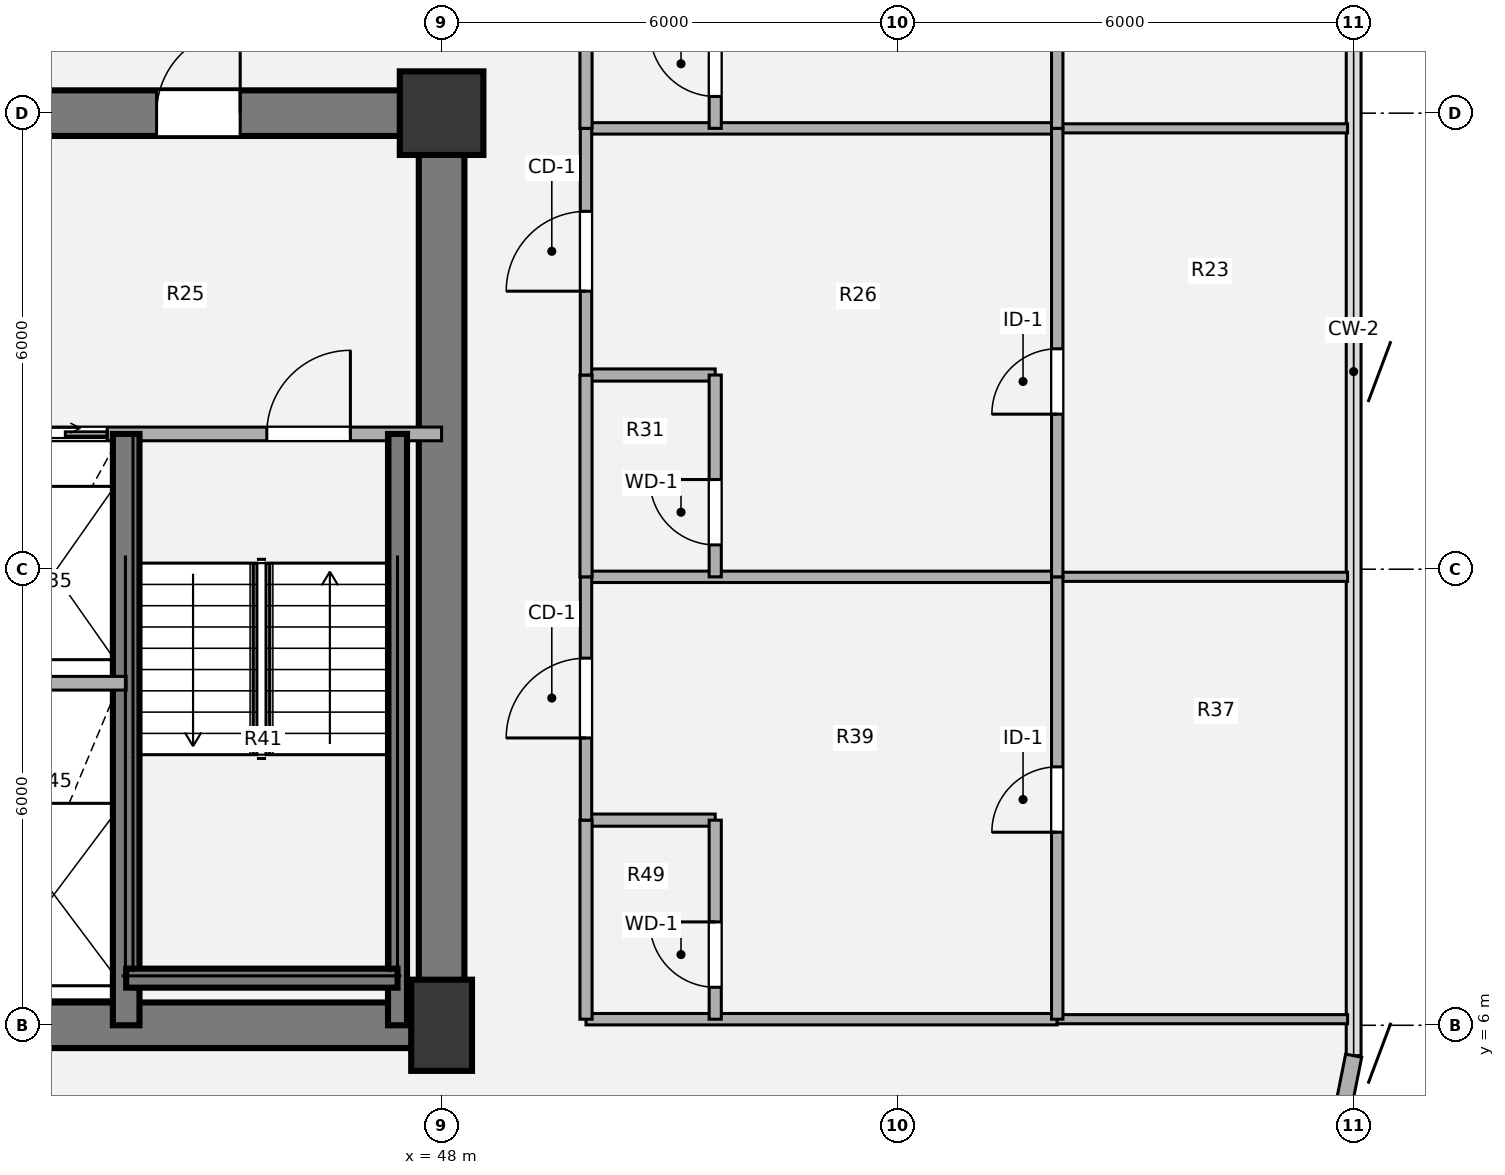
"""IFC4 building model, lengths in metres.
Left out: names, types, materials, properties, quantities, classifications, styles, units other than length and angle.
Written with IfcOpenShell. Run it as: python <this file> out.ifc"""

import sys

from ifc_helpers import new_model, si_unit, direction, frame, frame_2d, origin, origin_2d, place, context, subcontext, project, spatial, rectangle, extrude, source, transform, mapped, element, fill, save


model = new_model("IFC4")
c1 = context("Model", 3, precision=1e-05, world=origin(), true_north=direction((0.0, 1.0)))
c2 = subcontext(c1, "Body", "Model", "MODEL_VIEW")
j1 = project(units=[si_unit("LENGTHUNIT", "METRE"), si_unit("PLANEANGLEUNIT", "RADIAN")], contexts=[c1])
p1 = place(None, origin())
s1 = spatial("IfcSite", under=j1, at=p1, CompositionType="ELEMENT")
p2 = place(p1, origin())
s2 = spatial("IfcBuilding", under=s1, at=p2, CompositionType="ELEMENT")
p3 = place(p2, frame((0.0, 0.0, 38.34)))
s3 = spatial("IfcBuildingStorey", under=s2, at=p3, CompositionType="ELEMENT", Elevation=38.34)
m1 = source(origin(), c2, "Body", "SweptSolid", [
    extrude(rectangle(XDim=0.8, YDim=1.2, at=origin_2d()), origin(), (0.0, 0.0, 1.0), 3.78),
])
p4 = place(p3, frame((48.0, 6.0, 0.0), z_axis=(0.0, 0.0, 1.0), x_axis=(1.0, 0.0, 0.0)))
e1 = element("IfcColumn", 1, at=p4, inside=s3, PredefinedType="COLUMN", context=c2, shape_type="MappedRepresentation", body=[
    mapped(m1, transform((0.0, 0.0, 0.0), x_axis=(1.0, 0.0, 0.0), y_axis=(0.0, 1.0, 0.0), z_axis=(0.0, 0.0, 1.0), scale=1.0)),
])
m2 = source(origin(), c2, "Body", "SweptSolid", [
    extrude(rectangle(XDim=1.1, YDim=1.1, at=origin_2d()), origin(), (0.0, 0.0, 1.0), 3.78),
])
p5 = place(p3, frame((48.0, 18.0, 0.0), z_axis=(0.0, 0.0, 1.0), x_axis=(1.0, 0.0, 0.0)))
e2 = element("IfcColumn", 2, at=p5, inside=s3, PredefinedType="COLUMN", context=c2, shape_type="MappedRepresentation", body=[
    mapped(m2, transform((0.0, 0.0, 0.0), x_axis=(1.0, 0.0, 0.0), y_axis=(0.0, 1.0, 0.0), z_axis=(0.0, 0.0, 1.0), scale=1.0)),
])
p6 = place(p3, frame((48.3, 6.0, 0.0), z_axis=(0.0, 0.0, 1.0), x_axis=(-1.0, 0.0, 0.0)))
e3 = element("IfcWall", 3, at=p6, inside=s3, PredefinedType="SHEAR", context=c2, shape_type="SweptSolid", body=[
    extrude(rectangle(XDim=24.6, YDim=0.6, at=frame_2d((12.3, 0.0))), origin(), (0.0, 0.0, 1.0), 3.78),
])
p7 = place(p3, frame((48.0, 18.0, 0.0), z_axis=(0.0, 0.0, 1.0), x_axis=(0.0, -1.0, 0.0)))
e4 = element("IfcWall", 4, at=p7, inside=s3, PredefinedType="SHEAR", context=c2, shape_type="SweptSolid", body=[
    extrude(rectangle(XDim=12.0, YDim=0.6, at=frame_2d((6.0, 0.0))), origin(), (0.0, 0.0, 1.0), 3.78),
])
p8 = place(p3, frame((38.8, 18.0, 0.0), z_axis=(0.0, 0.0, 1.0), x_axis=(1.0, 0.0, 0.0)))
e5 = element("IfcWall", 5, at=p8, inside=s3, PredefinedType="SHEAR", context=c2, shape_type="SweptSolid", body=[
    extrude(rectangle(XDim=9.5, YDim=0.6, at=frame_2d((4.75, 0.0))), origin(), (0.0, 0.0, 1.0), 3.78),
])
p9 = place(p8, frame((5.45, 0.0, 0.0)))
e6 = element("IfcOpeningElement", 6, at=p9, cuts=e5, PredefinedType="OPENING", context=c2, shape_type="SweptSolid", body=[
    extrude(rectangle(XDim=1.1, YDim=2.1, at=origin_2d()), frame((0.55, 0.31, 1.05), z_axis=(0.0, -1.0, 0.0), x_axis=(1.0, 0.0, 0.0)), (0.0, 0.0, 1.0), 0.62),
])
p10 = place(p3, frame((60.0, 5.6, 0.0), z_axis=(0.0, 0.0, 1.0), x_axis=(-0.195138390419, -0.980775717779, 0.0)))
e7 = element("IfcWall", 7, at=p10, inside=s3, PredefinedType="SOLIDWALL", context=c2, shape_type="SweptSolid", body=[
    extrude(rectangle(XDim=1.249, YDim=0.215, at=frame_2d((0.624, 0.0))), origin(), (0.0, 0.0, 1.0), 3.53),
])
p11 = place(p3, frame((41.9, 13.78, 0.0), z_axis=(0.0, 0.0, 1.0), x_axis=(1.0, 0.0, 0.0)))
e8 = element("IfcWall", 8, at=p11, inside=s3, PredefinedType="PARTITIONING", context=c2, shape_type="SweptSolid", body=[
    extrude(rectangle(XDim=6.1, YDim=0.18, at=frame_2d((3.05, 0.0))), origin(), (0.0, 0.0, 1.0), 3.5),
])
p12 = place(p11, frame((0.6, 0.0, 0.0)))
e9 = element("IfcOpeningElement", 9, at=p12, cuts=e8, PredefinedType="OPENING", context=c2, shape_type="SweptSolid", body=[
    extrude(rectangle(XDim=1.1, YDim=2.1, at=origin_2d()), frame((0.55, 0.1, 1.05), z_axis=(0.0, -1.0, 0.0), x_axis=(1.0, 0.0, 0.0)), (0.0, 0.0, 1.0), 0.2),
])
p13 = place(p11, frame((3.8, 0.0, 0.0)))
e10 = element("IfcOpeningElement", 10, at=p13, cuts=e8, PredefinedType="OPENING", context=c2, shape_type="SweptSolid", body=[
    extrude(rectangle(XDim=1.1, YDim=2.1, at=origin_2d()), frame((0.55, 0.1, 1.05), z_axis=(0.0, -1.0, 0.0), x_axis=(1.0, 0.0, 0.0)), (0.0, 0.0, 1.0), 0.2),
])
p14 = place(p3, frame((43.85, 6.0, 0.0), z_axis=(0.0, 0.0, 1.0), x_axis=(0.0, 1.0, 0.0)))
e11 = element("IfcWall", 11, at=p14, inside=s3, PredefinedType="SHEAR", context=c2, shape_type="SweptSolid", body=[
    extrude(rectangle(XDim=7.78, YDim=0.35, at=frame_2d((3.89, 0.0))), origin(), (0.0, 0.0, 1.0), 3.85),
])
p15 = place(p3, frame((47.42, 6.0, 0.0), z_axis=(0.0, 0.0, 1.0), x_axis=(0.0, 1.0, 0.0)))
e12 = element("IfcWall", 12, at=p15, inside=s3, PredefinedType="SHEAR", context=c2, shape_type="SweptSolid", body=[
    extrude(rectangle(XDim=7.78, YDim=0.25, at=frame_2d((3.89, 0.0))), origin(), (0.0, 0.0, 1.0), 3.85),
])
p16 = place(p3, frame((43.85, 6.62, 0.0), z_axis=(0.0, 0.0, 1.0), x_axis=(1.0, 0.0, 0.0)))
e13 = element("IfcWall", 13, at=p16, inside=s3, PredefinedType="SHEAR", context=c2, shape_type="SweptSolid", body=[
    extrude(rectangle(XDim=3.57, YDim=0.25, at=frame_2d((1.785, 0.0))), origin(), (0.0, 0.0, 1.0), 3.85),
])
p17 = place(p3, frame((41.9, 10.5, 0.0), z_axis=(0.0, 0.0, 1.0), x_axis=(1.0, 0.0, 0.0)))
e14 = element("IfcWall", 14, at=p17, inside=s3, PredefinedType="PARTITIONING", context=c2, shape_type="SweptSolid", body=[
    extrude(rectangle(XDim=1.95, YDim=0.18, at=frame_2d((0.975, 0.0))), origin(), (0.0, 0.0, 1.0), 3.5),
])
p18 = place(p3, frame((49.9, 6.08, 0.0), z_axis=(0.0, 0.0, 1.0), x_axis=(1.0, 0.0, 0.0)))
e15 = element("IfcWall", 15, at=p18, inside=s3, PredefinedType="PARTITIONING", context=c2, shape_type="SweptSolid", body=[
    extrude(rectangle(XDim=6.2, YDim=0.15, at=frame_2d((3.1, 0.0))), origin(), (0.0, 0.0, 1.0), 3.5),
])
p19 = place(p3, frame((56.1, 6.08, 0.0), z_axis=(0.0, 0.0, 1.0), x_axis=(1.0, 0.0, 0.0)))
e16 = element("IfcWall", 16, at=p19, inside=s3, PredefinedType="PARTITIONING", context=c2, shape_type="SweptSolid", body=[
    extrude(rectangle(XDim=3.82, YDim=0.12, at=frame_2d((1.91, 0.0))), origin(), (0.0, 0.0, 1.0), 3.5),
])
p20 = place(p3, frame((49.9, 8.699, 0.0), z_axis=(0.0, 0.0, 1.0), x_axis=(1.0, 0.0, 0.0)))
e17 = element("IfcWall", 17, at=p20, inside=s3, PredefinedType="PLUMBINGWALL", context=c2, shape_type="SweptSolid", body=[
    extrude(rectangle(XDim=1.7, YDim=0.16, at=frame_2d((0.85, 0.0))), origin(), (0.0, 0.0, 1.0), 3.5),
])
p21 = place(p3, frame((49.9, 11.9, 0.0), z_axis=(0.0, 0.0, 1.0), x_axis=(1.0, 0.0, 0.0)))
e18 = element("IfcWall", 18, at=p21, inside=s3, PredefinedType="PARTITIONING", context=c2, shape_type="SweptSolid", body=[
    extrude(rectangle(XDim=6.2, YDim=0.15, at=frame_2d((3.1, 0.0))), origin(), (0.0, 0.0, 1.0), 3.5),
])
p22 = place(p3, frame((56.1, 11.9, 0.0), z_axis=(0.0, 0.0, 1.0), x_axis=(1.0, 0.0, 0.0)))
e19 = element("IfcWall", 19, at=p22, inside=s3, PredefinedType="PARTITIONING", context=c2, shape_type="SweptSolid", body=[
    extrude(rectangle(XDim=3.82, YDim=0.12, at=frame_2d((1.91, 0.0))), origin(), (0.0, 0.0, 1.0), 3.5),
])
p23 = place(p3, frame((49.9, 14.555, 0.0), z_axis=(0.0, 0.0, 1.0), x_axis=(1.0, 0.0, 0.0)))
e20 = element("IfcWall", 20, at=p23, inside=s3, PredefinedType="PLUMBINGWALL", context=c2, shape_type="SweptSolid", body=[
    extrude(rectangle(XDim=1.7, YDim=0.16, at=frame_2d((0.85, 0.0))), origin(), (0.0, 0.0, 1.0), 3.5),
])
p24 = place(p3, frame((49.9, 17.8, 0.0), z_axis=(0.0, 0.0, 1.0), x_axis=(1.0, 0.0, 0.0)))
e21 = element("IfcWall", 21, at=p24, inside=s3, PredefinedType="PARTITIONING", context=c2, shape_type="SweptSolid", body=[
    extrude(rectangle(XDim=6.2, YDim=0.15, at=frame_2d((3.1, 0.0))), origin(), (0.0, 0.0, 1.0), 3.5),
])
p25 = place(p3, frame((56.1, 17.8, 0.0), z_axis=(0.0, 0.0, 1.0), x_axis=(1.0, 0.0, 0.0)))
e22 = element("IfcWall", 22, at=p25, inside=s3, PredefinedType="PARTITIONING", context=c2, shape_type="SweptSolid", body=[
    extrude(rectangle(XDim=3.82, YDim=0.12, at=frame_2d((1.91, 0.0))), origin(), (0.0, 0.0, 1.0), 3.5),
])
p26 = place(p3, frame((49.9, 6.08, 0.0), z_axis=(0.0, 0.0, 1.0), x_axis=(0.0, 1.0, 0.0)))
e23 = element("IfcWall", 23, at=p26, inside=s3, PredefinedType="PLUMBINGWALL", context=c2, shape_type="SweptSolid", body=[
    extrude(rectangle(XDim=2.619, YDim=0.16, at=frame_2d((1.31, 0.0))), origin(), (0.0, 0.0, 1.0), 3.5),
])
p27 = place(p3, frame((49.9, 8.699, 0.0), z_axis=(0.0, 0.0, 1.0), x_axis=(0.0, 1.0, 0.0)))
e24 = element("IfcWall", 24, at=p27, inside=s3, PredefinedType="PARTITIONING", context=c2, shape_type="SweptSolid", body=[
    extrude(rectangle(XDim=3.201, YDim=0.15, at=frame_2d((1.601, 0.0))), origin(), (0.0, 0.0, 1.0), 3.5),
])
p28 = place(p27, frame((1.081, 0.0, 0.0)))
e25 = element("IfcOpeningElement", 25, at=p28, cuts=e24, PredefinedType="OPENING", context=c2, shape_type="SweptSolid", body=[
    extrude(rectangle(XDim=1.05, YDim=2.1, at=origin_2d()), frame((0.525, 0.085, 1.05), z_axis=(0.0, -1.0, 0.0), x_axis=(1.0, 0.0, 0.0)), (0.0, 0.0, 1.0), 0.17),
])
p29 = place(p3, frame((49.9, 11.9, 0.0), z_axis=(0.0, 0.0, 1.0), x_axis=(0.0, 1.0, 0.0)))
e26 = element("IfcWall", 26, at=p29, inside=s3, PredefinedType="PLUMBINGWALL", context=c2, shape_type="SweptSolid", body=[
    extrude(rectangle(XDim=2.655, YDim=0.16, at=frame_2d((1.328, 0.0))), origin(), (0.0, 0.0, 1.0), 3.5),
])
p30 = place(p3, frame((49.9, 14.555, 0.0), z_axis=(0.0, 0.0, 1.0), x_axis=(0.0, 1.0, 0.0)))
e27 = element("IfcWall", 27, at=p30, inside=s3, PredefinedType="PARTITIONING", context=c2, shape_type="SweptSolid", body=[
    extrude(rectangle(XDim=3.245, YDim=0.15, at=frame_2d((1.623, 0.0))), origin(), (0.0, 0.0, 1.0), 3.5),
])
p31 = place(p30, frame((1.103, 0.0, 0.0)))
e28 = element("IfcOpeningElement", 28, at=p31, cuts=e27, PredefinedType="OPENING", context=c2, shape_type="SweptSolid", body=[
    extrude(rectangle(XDim=1.05, YDim=2.1, at=origin_2d()), frame((0.525, 0.085, 1.05), z_axis=(0.0, -1.0, 0.0), x_axis=(1.0, 0.0, 0.0)), (0.0, 0.0, 1.0), 0.17),
])
p32 = place(p3, frame((49.9, 17.8, 0.0), z_axis=(0.0, 0.0, 1.0), x_axis=(0.0, 1.0, 0.0)))
e29 = element("IfcWall", 29, at=p32, inside=s3, PredefinedType="PLUMBINGWALL", context=c2, shape_type="SweptSolid", body=[
    extrude(rectangle(XDim=2.655, YDim=0.16, at=frame_2d((1.328, 0.0))), origin(), (0.0, 0.0, 1.0), 3.5),
])
p33 = place(p3, frame((51.6, 6.08, 0.0), z_axis=(0.0, 0.0, 1.0), x_axis=(0.0, 1.0, 0.0)))
e30 = element("IfcWall", 30, at=p33, inside=s3, PredefinedType="PLUMBINGWALL", context=c2, shape_type="SweptSolid", body=[
    extrude(rectangle(XDim=2.619, YDim=0.16, at=frame_2d((1.31, 0.0))), origin(), (0.0, 0.0, 1.0), 3.5),
])
p34 = place(p33, frame((0.42, 0.0, 0.0)))
e31 = element("IfcOpeningElement", 31, at=p34, cuts=e30, PredefinedType="OPENING", context=c2, shape_type="SweptSolid", body=[
    extrude(rectangle(XDim=0.86, YDim=2.1, at=origin_2d()), frame((0.43, 0.09, 1.05), z_axis=(0.0, -1.0, 0.0), x_axis=(1.0, 0.0, 0.0)), (0.0, 0.0, 1.0), 0.18),
])
p35 = place(p3, frame((51.6, 11.9, 0.0), z_axis=(0.0, 0.0, 1.0), x_axis=(0.0, 1.0, 0.0)))
e32 = element("IfcWall", 32, at=p35, inside=s3, PredefinedType="PLUMBINGWALL", context=c2, shape_type="SweptSolid", body=[
    extrude(rectangle(XDim=2.655, YDim=0.16, at=frame_2d((1.328, 0.0))), origin(), (0.0, 0.0, 1.0), 3.5),
])
p36 = place(p35, frame((0.42, 0.0, 0.0)))
e33 = element("IfcOpeningElement", 33, at=p36, cuts=e32, PredefinedType="OPENING", context=c2, shape_type="SweptSolid", body=[
    extrude(rectangle(XDim=0.86, YDim=2.1, at=origin_2d()), frame((0.43, 0.09, 1.05), z_axis=(0.0, -1.0, 0.0), x_axis=(1.0, 0.0, 0.0)), (0.0, 0.0, 1.0), 0.18),
])
p37 = place(p3, frame((51.6, 17.8, 0.0), z_axis=(0.0, 0.0, 1.0), x_axis=(0.0, 1.0, 0.0)))
e34 = element("IfcWall", 34, at=p37, inside=s3, PredefinedType="PLUMBINGWALL", context=c2, shape_type="SweptSolid", body=[
    extrude(rectangle(XDim=2.655, YDim=0.16, at=frame_2d((1.328, 0.0))), origin(), (0.0, 0.0, 1.0), 3.5),
])
p38 = place(p37, frame((0.42, 0.0, 0.0)))
e35 = element("IfcOpeningElement", 35, at=p38, cuts=e34, PredefinedType="OPENING", context=c2, shape_type="SweptSolid", body=[
    extrude(rectangle(XDim=0.86, YDim=2.1, at=origin_2d()), frame((0.43, 0.09, 1.05), z_axis=(0.0, -1.0, 0.0), x_axis=(1.0, 0.0, 0.0)), (0.0, 0.0, 1.0), 0.18),
])
p39 = place(p3, frame((56.1, 6.08, 0.0), z_axis=(0.0, 0.0, 1.0), x_axis=(0.0, 1.0, 0.0)))
e36 = element("IfcWall", 36, at=p39, inside=s3, PredefinedType="PARTITIONING", context=c2, shape_type="SweptSolid", body=[
    extrude(rectangle(XDim=5.82, YDim=0.15, at=frame_2d((2.91, 0.0))), origin(), (0.0, 0.0, 1.0), 3.5),
])
p40 = place(p39, frame((2.46, 0.0, 0.0)))
e37 = element("IfcOpeningElement", 37, at=p40, cuts=e36, PredefinedType="OPENING", context=c2, shape_type="SweptSolid", body=[
    extrude(rectangle(XDim=0.86, YDim=2.1, at=origin_2d()), frame((0.43, 0.085, 1.05), z_axis=(0.0, -1.0, 0.0), x_axis=(1.0, 0.0, 0.0)), (0.0, 0.0, 1.0), 0.17),
])
p41 = place(p3, frame((56.1, 11.9, 0.0), z_axis=(0.0, 0.0, 1.0), x_axis=(0.0, 1.0, 0.0)))
e38 = element("IfcWall", 38, at=p41, inside=s3, PredefinedType="PARTITIONING", context=c2, shape_type="SweptSolid", body=[
    extrude(rectangle(XDim=5.9, YDim=0.15, at=frame_2d((2.95, 0.0))), origin(), (0.0, 0.0, 1.0), 3.5),
])
p42 = place(p41, frame((2.14, 0.0, 0.0)))
e39 = element("IfcOpeningElement", 39, at=p42, cuts=e38, PredefinedType="OPENING", context=c2, shape_type="SweptSolid", body=[
    extrude(rectangle(XDim=0.86, YDim=2.1, at=origin_2d()), frame((0.43, 0.085, 1.05), z_axis=(0.0, -1.0, 0.0), x_axis=(1.0, 0.0, 0.0)), (0.0, 0.0, 1.0), 0.17),
])
p43 = place(p3, frame((56.1, 17.8, 0.0), z_axis=(0.0, 0.0, 1.0), x_axis=(0.0, 1.0, 0.0)))
e40 = element("IfcWall", 40, at=p43, inside=s3, PredefinedType="PARTITIONING", context=c2, shape_type="SweptSolid", body=[
    extrude(rectangle(XDim=5.9, YDim=0.15, at=frame_2d((2.95, 0.0))), origin(), (0.0, 0.0, 1.0), 3.5),
])
p44 = place(p43, frame((3.44, 0.0, 0.0)))
e41 = element("IfcOpeningElement", 41, at=p44, cuts=e40, PredefinedType="OPENING", context=c2, shape_type="SweptSolid", body=[
    extrude(rectangle(XDim=0.86, YDim=2.1, at=origin_2d()), frame((0.43, 0.085, 1.05), z_axis=(0.0, -1.0, 0.0), x_axis=(1.0, 0.0, 0.0)), (0.0, 0.0, 1.0), 0.17),
])
m3 = source(origin(), c2, "Body", "SweptSolid", [
    extrude(rectangle(XDim=1.1, YDim=2.1, at=origin_2d()), frame((0.55, 0.025, 1.05), z_axis=(0.0, -1.0, 0.0), x_axis=(1.0, 0.0, 0.0)), (0.0, 0.0, 1.0), 0.05),
])
p45 = place(p12, origin())
e42 = element("IfcDoor", 42, at=p45, inside=s3, OperationType="SLIDING_TO_RIGHT", PredefinedType="DOOR", context=c2, shape_type="MappedRepresentation", body=[
    mapped(m3, transform((0.0, 0.0, 0.0), x_axis=(1.0, 0.0, 0.0), y_axis=(0.0, 1.0, 0.0), z_axis=(0.0, 0.0, 1.0), scale=1.0)),
])
fill(e9, e42)
m4 = source(origin(), c2, "Body", "SweptSolid", [
    extrude(rectangle(XDim=1.1, YDim=2.1, at=origin_2d()), frame((0.55, 0.025, 1.05), z_axis=(0.0, -1.0, 0.0), x_axis=(1.0, 0.0, 0.0)), (0.0, 0.0, 1.0), 0.05),
])
p46 = place(p13, origin())
e43 = element("IfcDoor", 43, at=p46, inside=s3, OperationType="SINGLE_SWING_RIGHT", PredefinedType="DOOR", context=c2, shape_type="MappedRepresentation", body=[
    mapped(m4, transform((0.0, 0.0, 0.0), x_axis=(1.0, 0.0, 0.0), y_axis=(0.0, 1.0, 0.0), z_axis=(0.0, 0.0, 1.0), scale=1.0)),
])
fill(e10, e43)
m5 = source(origin(), c2, "Body", "SweptSolid", [
    extrude(rectangle(XDim=1.1, YDim=2.1, at=origin_2d()), frame((0.55, 0.025, 1.05), z_axis=(0.0, -1.0, 0.0), x_axis=(1.0, 0.0, 0.0)), (0.0, 0.0, 1.0), 0.05),
])
p47 = place(p9, origin())
e44 = element("IfcDoor", 44, at=p47, inside=s3, OperationType="SINGLE_SWING_RIGHT", PredefinedType="DOOR", context=c2, shape_type="MappedRepresentation", body=[
    mapped(m5, transform((0.0, 0.0, 0.0), x_axis=(1.0, 0.0, 0.0), y_axis=(0.0, 1.0, 0.0), z_axis=(0.0, 0.0, 1.0), scale=1.0)),
])
fill(e6, e44)
m6 = source(origin(), c2, "Body", "SweptSolid", [
    extrude(rectangle(XDim=1.05, YDim=2.1, at=origin_2d()), frame((0.525, 0.025, 1.05), z_axis=(0.0, -1.0, 0.0), x_axis=(1.0, 0.0, 0.0)), (0.0, 0.0, 1.0), 0.05),
])
p48 = place(p28, origin())
e45 = element("IfcDoor", 45, at=p48, inside=s3, OperationType="SINGLE_SWING_LEFT", PredefinedType="DOOR", context=c2, shape_type="MappedRepresentation", body=[
    mapped(m6, transform((0.0, 0.0, 0.0), x_axis=(1.0, 0.0, 0.0), y_axis=(0.0, 1.0, 0.0), z_axis=(0.0, 0.0, 1.0), scale=1.0)),
])
fill(e25, e45)
p49 = place(p31, origin())
e46 = element("IfcDoor", 46, at=p49, inside=s3, OperationType="SINGLE_SWING_LEFT", PredefinedType="DOOR", context=c2, shape_type="MappedRepresentation", body=[
    mapped(m6, transform((0.0, 0.0, 0.0), x_axis=(1.0, 0.0, 0.0), y_axis=(0.0, 1.0, 0.0), z_axis=(0.0, 0.0, 1.0), scale=1.0)),
])
fill(e28, e46)
m7 = source(origin(), c2, "Body", "SweptSolid", [
    extrude(rectangle(XDim=0.86, YDim=2.1, at=origin_2d()), frame((0.43, 0.025, 1.05), z_axis=(0.0, -1.0, 0.0), x_axis=(1.0, 0.0, 0.0)), (0.0, 0.0, 1.0), 0.05),
])
p50 = place(p34, origin())
e47 = element("IfcDoor", 47, at=p50, inside=s3, OperationType="SINGLE_SWING_RIGHT", PredefinedType="DOOR", context=c2, shape_type="MappedRepresentation", body=[
    mapped(m7, transform((0.0, 0.0, 0.0), x_axis=(1.0, 0.0, 0.0), y_axis=(0.0, 1.0, 0.0), z_axis=(0.0, 0.0, 1.0), scale=1.0)),
])
fill(e31, e47)
p51 = place(p36, origin())
e48 = element("IfcDoor", 48, at=p51, inside=s3, OperationType="SINGLE_SWING_RIGHT", PredefinedType="DOOR", context=c2, shape_type="MappedRepresentation", body=[
    mapped(m7, transform((0.0, 0.0, 0.0), x_axis=(1.0, 0.0, 0.0), y_axis=(0.0, 1.0, 0.0), z_axis=(0.0, 0.0, 1.0), scale=1.0)),
])
fill(e33, e48)
p52 = place(p38, origin())
e49 = element("IfcDoor", 49, at=p52, inside=s3, OperationType="SINGLE_SWING_RIGHT", PredefinedType="DOOR", context=c2, shape_type="MappedRepresentation", body=[
    mapped(m7, transform((0.0, 0.0, 0.0), x_axis=(1.0, 0.0, 0.0), y_axis=(0.0, 1.0, 0.0), z_axis=(0.0, 0.0, 1.0), scale=1.0)),
])
fill(e35, e49)
m8 = source(origin(), c2, "Body", "SweptSolid", [
    extrude(rectangle(XDim=0.86, YDim=2.1, at=origin_2d()), frame((0.43, 0.025, 1.05), z_axis=(0.0, -1.0, 0.0), x_axis=(1.0, 0.0, 0.0)), (0.0, 0.0, 1.0), 0.05),
])
p53 = place(p40, origin())
e50 = element("IfcDoor", 50, at=p53, inside=s3, OperationType="SINGLE_SWING_LEFT", PredefinedType="DOOR", context=c2, shape_type="MappedRepresentation", body=[
    mapped(m8, transform((0.0, 0.0, 0.0), x_axis=(1.0, 0.0, 0.0), y_axis=(0.0, 1.0, 0.0), z_axis=(0.0, 0.0, 1.0), scale=1.0)),
])
fill(e37, e50)
p54 = place(p42, origin())
e51 = element("IfcDoor", 51, at=p54, inside=s3, OperationType="SINGLE_SWING_LEFT", PredefinedType="DOOR", context=c2, shape_type="MappedRepresentation", body=[
    mapped(m8, transform((0.0, 0.0, 0.0), x_axis=(1.0, 0.0, 0.0), y_axis=(0.0, 1.0, 0.0), z_axis=(0.0, 0.0, 1.0), scale=1.0)),
])
fill(e39, e51)
save(model, sys.argv[1])
